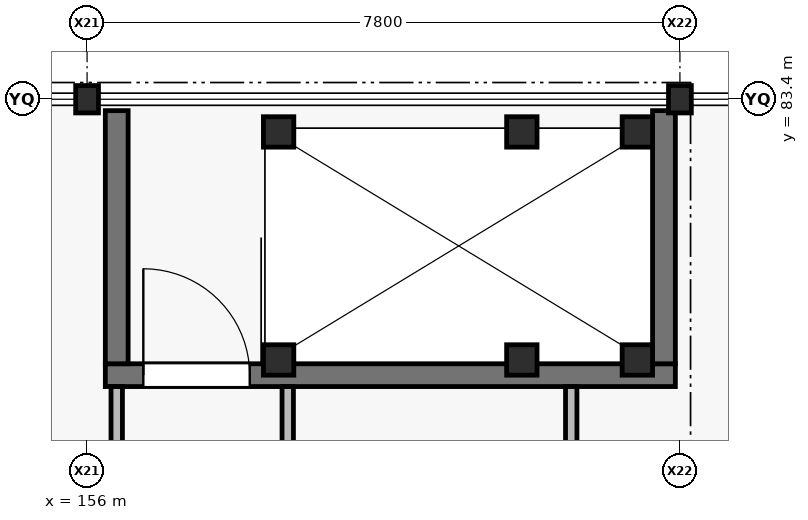
"""IFC4 building model, lengths in metres.
Left out: names, types, materials, properties, quantities, classifications, styles, units other than length and angle.
Written with IfcOpenShell. Run it as: python <this file> out.ifc"""

import sys

from ifc_helpers import new_model, si_unit, direction, frame, frame_2d, origin, origin_2d, place, context, subcontext, project, spatial, rectangle, i_section, extrude, element, fill, save


model = new_model("IFC4")
c1 = context("Model", 3, precision=1e-05, world=origin(), true_north=direction((0.0, 1.0)))
c2 = subcontext(c1, "Body", "Model", "MODEL_VIEW")
j1 = project(units=[si_unit("LENGTHUNIT", "METRE"), si_unit("PLANEANGLEUNIT", "RADIAN")], contexts=[c1])
p1 = place(None, origin())
s1 = spatial("IfcSite", under=j1, at=p1, CompositionType="ELEMENT")
p2 = place(p1, origin())
s2 = spatial("IfcBuilding", under=s1, at=p2, CompositionType="ELEMENT")
p3 = place(p2, frame((0.0, 0.0, 4.8)))
s3 = spatial("IfcBuildingStorey", under=s2, at=p3, CompositionType="ELEMENT", Elevation=4.8)
for number, where, z_axis, x_axis in (
    (1, (156.0, 83.4, 0.0), (0.0, 0.0, 1.0), (1.0, 0.0, 0.0)),
    (2, (163.8, 83.4, 0.0), (0.0, 0.0, 1.0), (1.0, 0.0, 0.0)),
):
    element("IfcColumn", number, at=place(p3, frame(where, z_axis=z_axis, x_axis=x_axis)), inside=s3, PredefinedType="COLUMN", context=c2, shape_type="SweptSolid", body=[
        extrude(i_section(OverallWidth=0.3, OverallDepth=0.36, WebThickness=0.012, FlangeThickness=0.022, at=origin_2d()), origin(), (0.0, 0.0, 1.0), 4.8),
    ])
for number, where, z_axis, x_axis in (
    (3, (158.52, 79.97, 0.0), (0.0, 0.0, 1.0), (1.0, 0.0, 0.0)),
    (4, (158.52, 82.97, 0.0), (0.0, 0.0, 1.0), (1.0, 0.0, 0.0)),
    (5, (161.72, 79.97, 0.0), (0.0, 0.0, 1.0), (1.0, 0.0, 0.0)),
    (6, (161.72, 82.97, 0.0), (0.0, 0.0, 1.0), (1.0, 0.0, 0.0)),
    (7, (163.24, 79.97, 0.0), (0.0, 0.0, 1.0), (1.0, 0.0, 0.0)),
    (8, (163.24, 82.97, 0.0), (0.0, 0.0, 1.0), (1.0, 0.0, 0.0)),
):
    element("IfcColumn", number, at=place(p3, frame(where, z_axis=z_axis, x_axis=x_axis)), inside=s3, PredefinedType="COLUMN", context=c2, shape_type="SweptSolid", body=[
        extrude(rectangle(XDim=0.4, YDim=0.4, at=origin_2d()), origin(), (0.0, 0.0, 1.0), 4.8),
    ])
p4 = place(p3, frame((156.24, 79.77, 0.0), z_axis=(0.0, 0.0, 1.0), x_axis=(1.0, 0.0, 0.0)))
e9 = element("IfcWall", 9, at=p4, inside=s3, PredefinedType="SHEAR", context=c2, shape_type="SweptSolid", body=[
    extrude(rectangle(XDim=7.5, YDim=0.3, at=frame_2d((3.75, 0.0))), origin(), (0.0, 0.0, 1.0), 4.54),
])
p5 = place(p4, frame((0.5, 0.0, 0.0)))
e10 = element("IfcOpeningElement", 10, at=p5, cuts=e9, PredefinedType="OPENING", context=c2, shape_type="SweptSolid", body=[
    extrude(rectangle(XDim=1.4, YDim=2.2, at=frame_2d((0.7, 1.1))), frame((0.0, 0.16, 0.0), z_axis=(0.0, -1.0, 0.0), x_axis=(1.0, 0.0, 0.0)), (0.0, 0.0, 1.0), 0.32),
])
for number, where, z_axis, x_axis in (
    (11, (156.39, 83.25, 0.0), (0.0, 0.0, 1.0), (0.0, -1.0, 0.0)),
    (12, (163.59, 79.92, 0.0), (0.0, 0.0, 1.0), (0.0, 1.0, 0.0)),
):
    element("IfcWall", number, at=place(p3, frame(where, z_axis=z_axis, x_axis=x_axis)), inside=s3, PredefinedType="SHEAR", context=c2, shape_type="SweptSolid", body=[
        extrude(rectangle(XDim=3.33, YDim=0.3, at=frame_2d((1.665, 0.0))), origin(), (0.0, 0.0, 1.0), 4.54),
    ])
for number, where, z_axis, x_axis in (
    (13, (156.39, 75.0, 0.0), (0.0, 0.0, 1.0), (0.0, 1.0, 0.0)),
    (14, (158.64, 75.0, 0.0), (0.0, 0.0, 1.0), (0.0, 1.0, 0.0)),
):
    element("IfcWall", number, at=place(p3, frame(where, z_axis=z_axis, x_axis=x_axis)), inside=s3, PredefinedType="PARTITIONING", context=c2, shape_type="SweptSolid", body=[
        extrude(rectangle(XDim=4.62, YDim=0.15, at=frame_2d((2.31, 0.0))), origin(), (0.0, 0.0, 1.0), 4.54),
    ])
p6 = place(p3, frame((162.37, 75.075, 0.0), z_axis=(0.0, 0.0, 1.0), x_axis=(0.0, 1.0, 0.0)))
e15 = element("IfcWall", 15, at=p6, inside=s3, PredefinedType="PARTITIONING", context=c2, shape_type="SweptSolid", body=[
    extrude(rectangle(XDim=4.545, YDim=0.15, at=frame_2d((2.272, 0.0))), origin(), (0.0, 0.0, 1.0), 4.54),
])
p7 = place(p5, origin())
e16 = element("IfcDoor", 16, at=p7, inside=s3, OperationType="SINGLE_SWING_LEFT", PredefinedType="DOOR", context=c2, shape_type="SweptSolid", body=[
    extrude(rectangle(XDim=1.4, YDim=2.2, at=frame_2d((0.7, 1.1))), frame((0.0, 0.025, 0.0), z_axis=(0.0, -1.0, 0.0), x_axis=(1.0, 0.0, 0.0)), (0.0, 0.0, 1.0), 0.05),
])
fill(e10, e16)
save(model, sys.argv[1])
